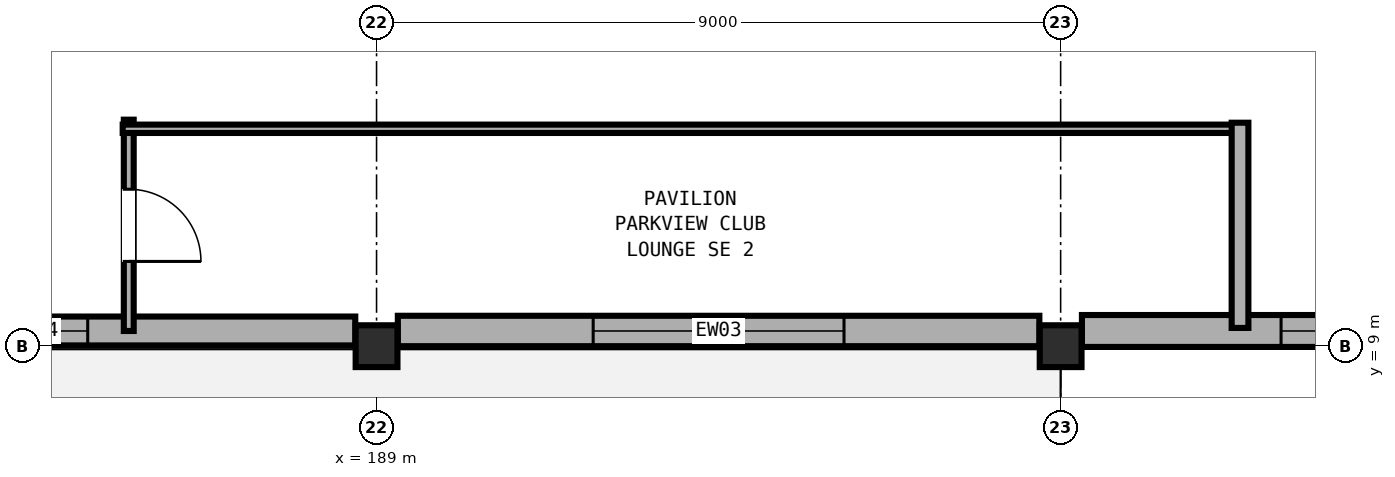
"""IFC4 building model, lengths in metres.
Left out: names, types, materials, properties, quantities, classifications, styles, units other than length and angle.
Written with IfcOpenShell. Run it as: python <this file> out.ifc"""

import sys

from ifc_helpers import new_model, si_unit, direction, frame, frame_2d, origin, origin_2d, place, context, subcontext, project, spatial, rectangle, extrude, element, fill, save


model = new_model("IFC4")
c1 = context("Model", 3, precision=1e-05, world=origin(), true_north=direction((0.0, 1.0)))
c2 = subcontext(c1, "Body", "Model", "MODEL_VIEW")
j1 = project(units=[si_unit("LENGTHUNIT", "METRE"), si_unit("PLANEANGLEUNIT", "RADIAN")], contexts=[c1])
p1 = place(None, origin())
s1 = spatial("IfcSite", under=j1, at=p1, CompositionType="ELEMENT")
p2 = place(p1, origin())
s2 = spatial("IfcBuilding", under=s1, at=p2, CompositionType="ELEMENT")
p3 = place(p2, frame((0.0, 0.0, 9.6)))
s3 = spatial("IfcBuildingStorey", under=s2, at=p3, CompositionType="ELEMENT", Elevation=9.6)
for number, where, z_axis, x_axis in (
    (1, (189.0, 9.0, 0.0), (0.0, 0.0, 1.0), (1.0, 0.0, 0.0)),
    (2, (198.0, 9.0, 0.0), (0.0, 0.0, 1.0), (1.0, 0.0, 0.0)),
):
    element("IfcColumn", number, at=place(p3, frame(where, z_axis=z_axis, x_axis=x_axis)), inside=s3, PredefinedType="COLUMN", context=c2, shape_type="SweptSolid", body=[
        extrude(rectangle(XDim=0.55, YDim=0.55, at=origin_2d()), origin(), (0.0, 0.0, 1.0), 4.8),
    ])
p4 = place(p3, frame((206.72, 9.2, 0.0), z_axis=(0.0, 0.0, 1.0), x_axis=(-1.0, 0.0, 0.0)))
e3 = element("IfcWall", 3, at=p4, inside=s3, PredefinedType="SOLIDWALL", context=c2, shape_type="SweptSolid", body=[
    extrude(rectangle(XDim=8.44, YDim=0.42, at=frame_2d((4.22, 0.0))), origin(), (0.0, 0.0, 1.0), 3.58),
])
p5 = place(p4, frame((2.62, 0.0, 0.9)))
e4 = element("IfcOpeningElement", 4, at=p5, cuts=e3, PredefinedType="OPENING", context=c2, shape_type="SweptSolid", body=[
    extrude(rectangle(XDim=3.2, YDim=2.05, at=frame_2d((1.6, 1.025))), frame((0.0, 0.22, 0.0), z_axis=(0.0, -1.0, 0.0), x_axis=(1.0, 0.0, 0.0)), (0.0, 0.0, 1.0), 0.44),
])
p6 = place(p3, frame((197.72, 9.2, 0.0), z_axis=(0.0, 0.0, 1.0), x_axis=(-1.0, 0.0, 0.0)))
e5 = element("IfcWall", 5, at=p6, inside=s3, PredefinedType="SOLIDWALL", context=c2, shape_type="SweptSolid", body=[
    extrude(rectangle(XDim=8.44, YDim=0.4, at=frame_2d((4.22, 0.0))), origin(), (0.0, 0.0, 1.0), 3.58),
])
p7 = place(p6, frame((2.57, 0.0, 0.9)))
e6 = element("IfcOpeningElement", 6, at=p7, cuts=e5, PredefinedType="OPENING", context=c2, shape_type="SweptSolid", body=[
    extrude(rectangle(XDim=3.3, YDim=2.0, at=frame_2d((1.65, 1.0))), frame((0.0, 0.21, 0.0), z_axis=(0.0, -1.0, 0.0), x_axis=(1.0, 0.0, 0.0)), (0.0, 0.0, 1.0), 0.42),
])
p8 = place(p3, frame((188.72, 9.2, 0.0), z_axis=(0.0, 0.0, 1.0), x_axis=(-1.0, 0.0, 0.0)))
e7 = element("IfcWall", 7, at=p8, inside=s3, PredefinedType="SOLIDWALL", context=c2, shape_type="SweptSolid", body=[
    extrude(rectangle(XDim=8.44, YDim=0.38, at=frame_2d((4.22, 0.0))), origin(), (0.0, 0.0, 1.0), 3.58),
])
p9 = place(p8, frame((3.52, 0.0, 0.9)))
e8 = element("IfcOpeningElement", 8, at=p9, cuts=e7, PredefinedType="OPENING", context=c2, shape_type="SweptSolid", body=[
    extrude(rectangle(XDim=3.4, YDim=1.95, at=frame_2d((1.7, 0.975))), frame((0.0, 0.2, 0.0), z_axis=(0.0, -1.0, 0.0), x_axis=(1.0, 0.0, 0.0)), (0.0, 0.0, 1.0), 0.4),
])
p10 = place(p3, frame((185.74, 11.98, 0.0), z_axis=(0.0, 0.0, 1.0), x_axis=(0.0, -1.0, 0.0)))
e9 = element("IfcWall", 9, at=p10, inside=s3, PredefinedType="PARTITIONING", context=c2, shape_type="SweptSolid", body=[
    extrude(rectangle(XDim=2.78, YDim=0.13, at=frame_2d((1.39, 0.0))), origin(), (0.0, 0.0, 1.0), 3.56),
])
p11 = place(p10, frame((0.915, 0.0, 0.0)))
e10 = element("IfcOpeningElement", 10, at=p11, cuts=e9, PredefinedType="OPENING", context=c2, shape_type="SweptSolid", body=[
    extrude(rectangle(XDim=0.95, YDim=2.1, at=frame_2d((0.475, 1.05))), frame((0.0, 0.075, 0.0), z_axis=(0.0, -1.0, 0.0), x_axis=(1.0, 0.0, 0.0)), (0.0, 0.0, 1.0), 0.15),
])
p12 = place(p3, frame((185.66, 11.86, 0.0), z_axis=(0.0, 0.0, 1.0), x_axis=(1.0, 0.0, 0.0)))
e11 = element("IfcWall", 11, at=p12, inside=s3, PredefinedType="PARTITIONING", context=c2, shape_type="SweptSolid", body=[
    extrude(rectangle(XDim=14.78, YDim=0.11, at=frame_2d((7.39, 0.0))), origin(), (0.0, 0.0, 1.0), 3.56),
])
p13 = place(p3, frame((200.36, 11.94, 0.0), z_axis=(0.0, 0.0, 1.0), x_axis=(0.0, -1.0, 0.0)))
e12 = element("IfcWall", 12, at=p13, inside=s3, PredefinedType="PARTITIONING", context=c2, shape_type="SweptSolid", body=[
    extrude(rectangle(XDim=2.7, YDim=0.22, at=frame_2d((1.35, 0.0))), origin(), (0.0, 0.0, 1.0), 3.56),
])
p14 = place(p5, origin())
e13 = element("IfcWindow", 13, at=p14, inside=s3, PartitioningType="DOUBLE_PANEL_VERTICAL", PredefinedType="WINDOW", context=c2, shape_type="SweptSolid", body=[
    extrude(rectangle(XDim=3.2, YDim=2.05, at=frame_2d((1.6, 1.025))), frame((0.0, 0.03, 0.0), z_axis=(0.0, -1.0, 0.0), x_axis=(1.0, 0.0, 0.0)), (0.0, 0.0, 1.0), 0.06),
])
fill(e4, e13)
p15 = place(p7, origin())
e14 = element("IfcWindow", 14, at=p15, inside=s3, PartitioningType="DOUBLE_PANEL_VERTICAL", PredefinedType="WINDOW", context=c2, shape_type="SweptSolid", body=[
    extrude(rectangle(XDim=3.3, YDim=2.0, at=frame_2d((1.65, 1.0))), frame((0.0, 0.03, 0.0), z_axis=(0.0, -1.0, 0.0), x_axis=(1.0, 0.0, 0.0)), (0.0, 0.0, 1.0), 0.06),
])
fill(e6, e14)
p16 = place(p9, origin())
e15 = element("IfcWindow", 15, at=p16, inside=s3, PartitioningType="DOUBLE_PANEL_VERTICAL", PredefinedType="WINDOW", context=c2, shape_type="SweptSolid", body=[
    extrude(rectangle(XDim=3.4, YDim=1.95, at=frame_2d((1.7, 0.975))), frame((0.0, 0.03, 0.0), z_axis=(0.0, -1.0, 0.0), x_axis=(1.0, 0.0, 0.0)), (0.0, 0.0, 1.0), 0.06),
])
fill(e8, e15)
p17 = place(p11, origin())
e16 = element("IfcDoor", 16, at=p17, inside=s3, OperationType="SINGLE_SWING_RIGHT", PredefinedType="DOOR", context=c2, shape_type="SweptSolid", body=[
    extrude(rectangle(XDim=0.95, YDim=2.1, at=frame_2d((0.475, 1.05))), frame((0.0, 0.025, 0.0), z_axis=(0.0, -1.0, 0.0), x_axis=(1.0, 0.0, 0.0)), (0.0, 0.0, 1.0), 0.05),
])
fill(e10, e16)
save(model, sys.argv[1])
